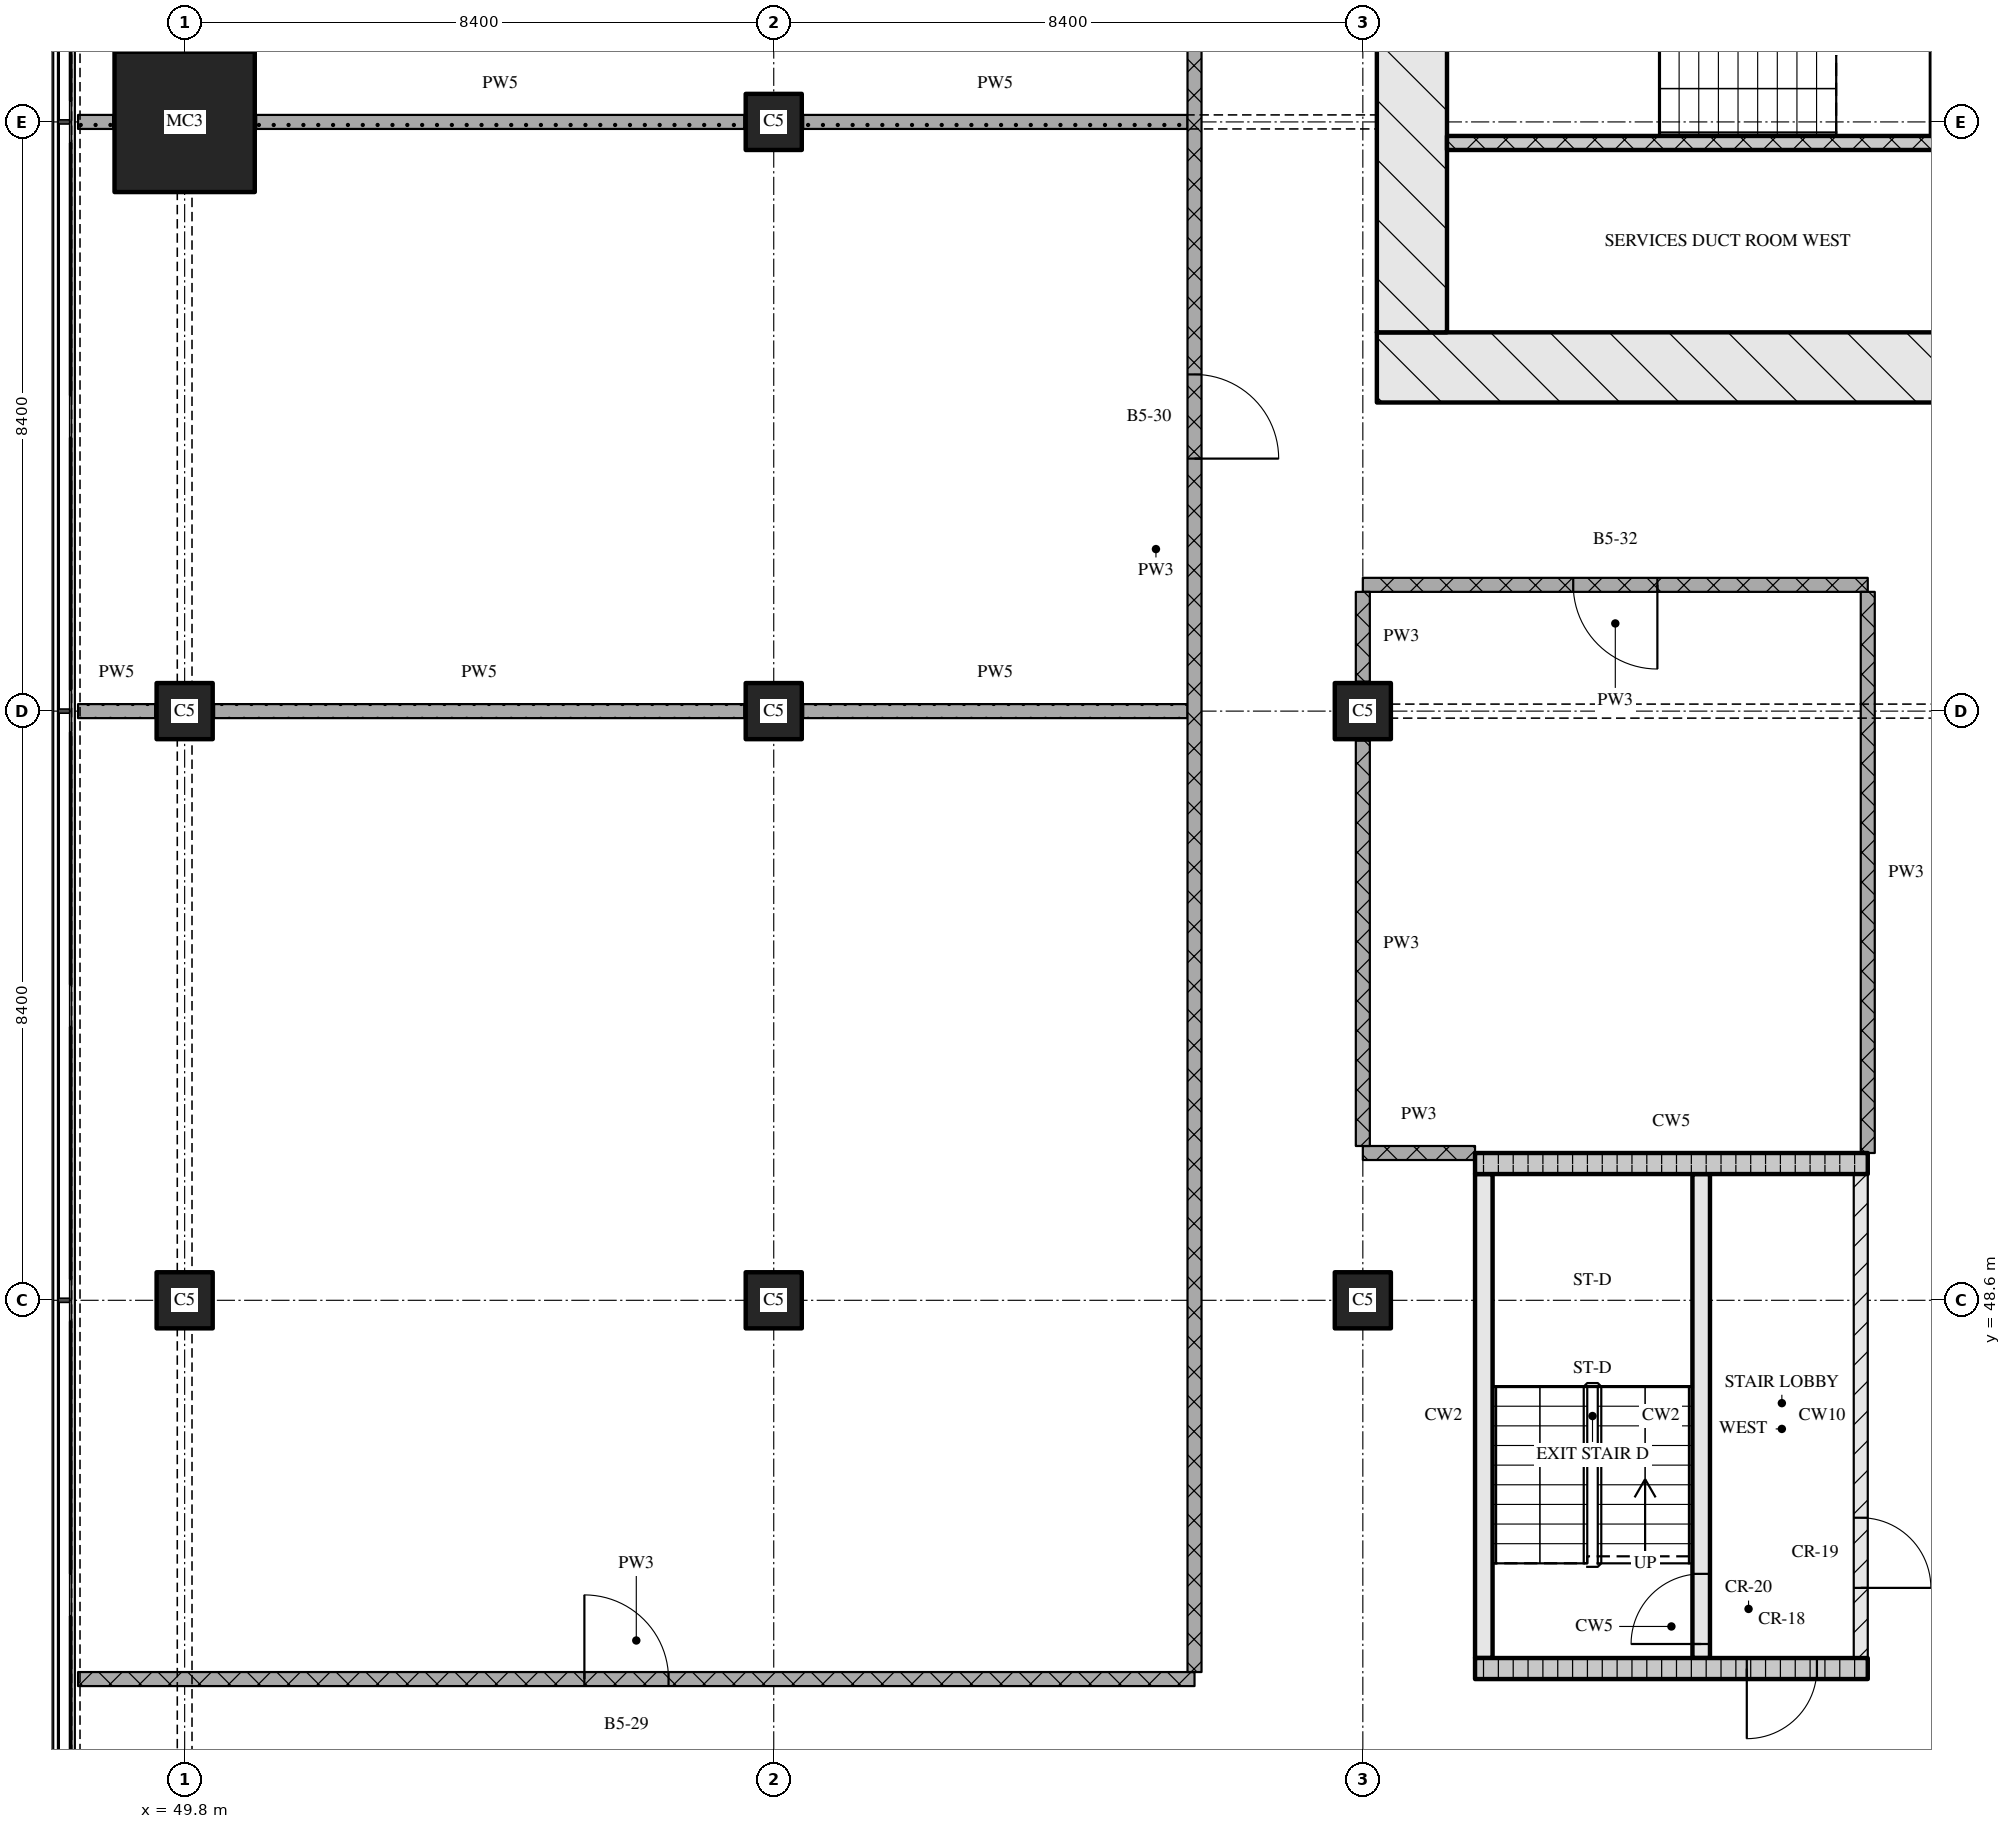
"""IFC4 building model, lengths in metres.
Left out: names, types, materials, properties, quantities, classifications, styles, units other than length and angle.
Written with IfcOpenShell. Run it as: python <this file> out.ifc"""

import sys

from ifc_helpers import new_model, si_unit, direction, frame, frame_2d, origin, origin_2d, place, context, subcontext, project, spatial, rectangle, extrude, element, fill, save


model = new_model("IFC4")
c1 = context("Model", 3, precision=1e-05, world=origin(), true_north=direction((0.0, 1.0)))
c2 = subcontext(c1, "Body", "Model", "MODEL_VIEW")
j1 = project(units=[si_unit("LENGTHUNIT", "METRE"), si_unit("PLANEANGLEUNIT", "RADIAN")], contexts=[c1])
p1 = place(None, origin())
s1 = spatial("IfcSite", under=j1, at=p1, CompositionType="ELEMENT")
p2 = place(p1, origin())
s2 = spatial("IfcBuilding", under=s1, at=p2, CompositionType="ELEMENT")
p3 = place(p2, frame((0.0, 0.0, 138.45)))
s3 = spatial("IfcBuildingStorey", under=s2, at=p3, CompositionType="ELEMENT", Elevation=138.45)
for number, where, z_axis, x_axis in (
    (1, (49.8, 48.6, 0.0), (0.0, 0.0, 1.0), (1.0, 0.0, 0.0)),
    (2, (49.8, 57.0, 0.0), (0.0, 0.0, 1.0), (1.0, 0.0, 0.0)),
):
    element("IfcColumn", number, at=place(p3, frame(where, z_axis=z_axis, x_axis=x_axis)), inside=s3, PredefinedType="COLUMN", context=c2, shape_type="SweptSolid", body=[
        extrude(rectangle(XDim=0.8, YDim=0.8, at=origin_2d()), origin(), (0.0, 0.0, 1.0), 3.6),
    ])
p4 = place(p3, frame((49.8, 65.4, 0.0), z_axis=(0.0, 0.0, 1.0), x_axis=(1.0, 0.0, 0.0)))
e3 = element("IfcColumn", 3, at=p4, inside=s3, PredefinedType="COLUMN", context=c2, shape_type="SweptSolid", body=[
    extrude(rectangle(XDim=2.0, YDim=2.0, at=origin_2d()), origin(), (0.0, 0.0, 1.0), 3.6),
])
for number, where, z_axis, x_axis in (
    (4, (58.2, 48.6, 0.0), (0.0, 0.0, 1.0), (1.0, 0.0, 0.0)),
    (5, (58.2, 57.0, 0.0), (0.0, 0.0, 1.0), (1.0, 0.0, 0.0)),
    (6, (58.2, 65.4, 0.0), (0.0, 0.0, 1.0), (1.0, 0.0, 0.0)),
    (7, (66.6, 48.6, 0.0), (0.0, 0.0, 1.0), (1.0, 0.0, 0.0)),
    (8, (66.6, 57.0, 0.0), (0.0, 0.0, 1.0), (1.0, 0.0, 0.0)),
):
    element("IfcColumn", number, at=place(p3, frame(where, z_axis=z_axis, x_axis=x_axis)), inside=s3, PredefinedType="COLUMN", context=c2, shape_type="SweptSolid", body=[
        extrude(rectangle(XDim=0.8, YDim=0.8, at=origin_2d()), origin(), (0.0, 0.0, 1.0), 3.6),
    ])
p5 = place(p3, frame((66.8, 61.9, 0.0), z_axis=(0.0, 0.0, 1.0), x_axis=(1.0, 0.0, 0.0)))
e9 = element("IfcWall", 9, at=p5, inside=s3, PredefinedType="SOLIDWALL", context=c2, shape_type="SweptSolid", body=[
    extrude(rectangle(XDim=41.6, YDim=1.0, at=frame_2d((20.8, 0.0))), origin(), (0.0, 0.0, 1.0), 3.3),
])
p6 = place(p5, frame((21.15, 0.0, 0.0)))
e10 = element("IfcOpeningElement", 10, at=p6, cuts=e9, PredefinedType="OPENING", context=c2, shape_type="SweptSolid", body=[
    extrude(rectangle(XDim=1.8, YDim=2.1, at=frame_2d((0.9, 1.05))), frame((0.0, 0.51, 0.0), z_axis=(0.0, -1.0, 0.0), x_axis=(1.0, 0.0, 0.0)), (0.0, 0.0, 1.0), 1.02),
])
p7 = place(p3, frame((67.3, 62.4, 0.0), z_axis=(0.0, 0.0, 1.0), x_axis=(0.0, 1.0, 0.0)))
e11 = element("IfcWall", 11, at=p7, inside=s3, PredefinedType="SOLIDWALL", context=c2, shape_type="SweptSolid", body=[
    extrude(rectangle(XDim=12.0, YDim=1.0, at=frame_2d((6.0, 0.0))), origin(), (0.0, 0.0, 1.0), 3.3),
])
p8 = place(p7, frame((6.45, 0.0, 0.0)))
e12 = element("IfcOpeningElement", 12, at=p8, cuts=e11, PredefinedType="OPENING", context=c2, shape_type="SweptSolid", body=[
    extrude(rectangle(XDim=1.2, YDim=2.1, at=frame_2d((0.6, 1.05))), frame((0.0, 0.51, 0.0), z_axis=(0.0, -1.0, 0.0), x_axis=(1.0, 0.0, 0.0)), (0.0, 0.0, 1.0), 1.02),
])
p9 = place(p3, frame((67.8, 65.1, 0.0), z_axis=(0.0, 0.0, 1.0), x_axis=(1.0, 0.0, 0.0)))
e13 = element("IfcWall", 13, at=p9, inside=s3, PredefinedType="SOLIDWALL", context=c2, shape_type="SweptSolid", body=[
    extrude(rectangle(XDim=18.5, YDim=0.2, at=frame_2d((9.25, 0.0))), origin(), (0.0, 0.0, 1.0), 3.3),
])
p10 = place(p9, frame((7.27, 0.0, 0.0)))
e14 = element("IfcOpeningElement", 14, at=p10, cuts=e13, PredefinedType="OPENING", context=c2, shape_type="SweptSolid", body=[
    extrude(rectangle(XDim=0.9, YDim=2.1, at=frame_2d((0.45, 1.05))), frame((0.0, 0.11, 0.0), z_axis=(0.0, -1.0, 0.0), x_axis=(1.0, 0.0, 0.0)), (0.0, 0.0, 1.0), 0.22),
])
p11 = place(p9, frame((8.85, 0.0, 0.0)))
e15 = element("IfcOpeningElement", 15, at=p11, cuts=e13, PredefinedType="OPENING", context=c2, shape_type="SweptSolid", body=[
    extrude(rectangle(XDim=1.1, YDim=2.1, at=frame_2d((0.55, 1.05))), frame((0.0, 0.11, 0.0), z_axis=(0.0, -1.0, 0.0), x_axis=(1.0, 0.0, 0.0)), (0.0, 0.0, 1.0), 0.22),
])
p12 = place(p9, frame((11.35, 0.0, 0.0)))
e16 = element("IfcOpeningElement", 16, at=p12, cuts=e13, PredefinedType="OPENING", context=c2, shape_type="SweptSolid", body=[
    extrude(rectangle(XDim=1.1, YDim=2.1, at=frame_2d((0.55, 1.05))), frame((0.0, 0.11, 0.0), z_axis=(0.0, -1.0, 0.0), x_axis=(1.0, 0.0, 0.0)), (0.0, 0.0, 1.0), 0.22),
])
p13 = place(p9, frame((13.85, 0.0, 0.0)))
e17 = element("IfcOpeningElement", 17, at=p13, cuts=e13, PredefinedType="OPENING", context=c2, shape_type="SweptSolid", body=[
    extrude(rectangle(XDim=1.1, YDim=2.1, at=frame_2d((0.55, 1.05))), frame((0.0, 0.11, 0.0), z_axis=(0.0, -1.0, 0.0), x_axis=(1.0, 0.0, 0.0)), (0.0, 0.0, 1.0), 0.22),
])
p14 = place(p9, frame((16.7, 0.0, 0.0)))
e18 = element("IfcOpeningElement", 18, at=p14, cuts=e13, PredefinedType="OPENING", context=c2, shape_type="SweptSolid", body=[
    extrude(rectangle(XDim=0.9, YDim=2.1, at=frame_2d((0.45, 1.05))), frame((0.0, 0.11, 0.0), z_axis=(0.0, -1.0, 0.0), x_axis=(1.0, 0.0, 0.0)), (0.0, 0.0, 1.0), 0.22),
])
p15 = place(p3, frame((68.2, 43.35, 0.0), z_axis=(0.0, 0.0, 1.0), x_axis=(1.0, 0.0, 0.0)))
e19 = element("IfcWall", 19, at=p15, inside=s3, PredefinedType="SOLIDWALL", context=c2, shape_type="SweptSolid", body=[
    extrude(rectangle(XDim=5.6, YDim=0.3, at=frame_2d((2.8, 0.0))), origin(), (0.0, 0.0, 1.0), 3.3),
])
p16 = place(p15, frame((3.875, 0.0, 0.0)))
e20 = element("IfcOpeningElement", 20, at=p16, cuts=e19, PredefinedType="OPENING", context=c2, shape_type="SweptSolid", body=[
    extrude(rectangle(XDim=1.0, YDim=2.1, at=frame_2d((0.5, 1.05))), frame((0.0, 0.16, 0.0), z_axis=(0.0, -1.0, 0.0), x_axis=(1.0, 0.0, 0.0)), (0.0, 0.0, 1.0), 0.32),
])
p17 = place(p3, frame((68.325, 43.5, 0.0), z_axis=(0.0, 0.0, 1.0), x_axis=(0.0, 1.0, 0.0)))
e21 = element("IfcWall", 21, at=p17, inside=s3, PredefinedType="SOLIDWALL", context=c2, shape_type="SweptSolid", body=[
    extrude(rectangle(XDim=6.9, YDim=0.25, at=frame_2d((3.45, 0.0))), origin(), (0.0, 0.0, 1.0), 3.3),
])
p18 = place(p3, frame((71.425, 43.5, 0.0), z_axis=(0.0, 0.0, 1.0), x_axis=(0.0, 1.0, 0.0)))
e22 = element("IfcWall", 22, at=p18, inside=s3, PredefinedType="SOLIDWALL", context=c2, shape_type="SweptSolid", body=[
    extrude(rectangle(XDim=6.9, YDim=0.25, at=frame_2d((3.45, 0.0))), origin(), (0.0, 0.0, 1.0), 3.3),
])
p19 = place(p18, frame((0.2, 0.0, 0.0)))
e23 = element("IfcOpeningElement", 23, at=p19, cuts=e22, PredefinedType="OPENING", context=c2, shape_type="SweptSolid", body=[
    extrude(rectangle(XDim=1.0, YDim=2.1, at=frame_2d((0.5, 1.05))), frame((0.0, 0.135, 0.0), z_axis=(0.0, -1.0, 0.0), x_axis=(1.0, 0.0, 0.0)), (0.0, 0.0, 1.0), 0.27),
])
p20 = place(p3, frame((73.7, 43.5, 0.0), z_axis=(0.0, 0.0, 1.0), x_axis=(0.0, 1.0, 0.0)))
e24 = element("IfcWall", 24, at=p20, inside=s3, PredefinedType="PARTITIONING", context=c2, shape_type="SweptSolid", body=[
    extrude(rectangle(XDim=6.9, YDim=0.2, at=frame_2d((3.45, 0.0))), origin(), (0.0, 0.0, 1.0), 3.3),
])
p21 = place(p20, frame((1.0, 0.0, 0.0)))
e25 = element("IfcOpeningElement", 25, at=p21, cuts=e24, PredefinedType="OPENING", context=c2, shape_type="SweptSolid", body=[
    extrude(rectangle(XDim=1.0, YDim=2.1, at=frame_2d((0.5, 1.05))), frame((0.0, 0.11, 0.0), z_axis=(0.0, -1.0, 0.0), x_axis=(1.0, 0.0, 0.0)), (0.0, 0.0, 1.0), 0.22),
])
p22 = place(p3, frame((68.2, 50.55, 0.0), z_axis=(0.0, 0.0, 1.0), x_axis=(1.0, 0.0, 0.0)))
e26 = element("IfcWall", 26, at=p22, inside=s3, PredefinedType="SOLIDWALL", context=c2, shape_type="SweptSolid", body=[
    extrude(rectangle(XDim=5.6, YDim=0.3, at=frame_2d((2.8, 0.0))), origin(), (0.0, 0.0, 1.0), 3.3),
])
p23 = place(p3, frame((48.28, 43.2, 0.0), z_axis=(0.0, 0.0, 1.0), x_axis=(1.0, 0.0, 0.0)))
e27 = element("IfcWall", 27, at=p23, inside=s3, PredefinedType="PARTITIONING", context=c2, shape_type="SweptSolid", body=[
    extrude(rectangle(XDim=15.92, YDim=0.2, at=frame_2d((7.96, 0.0))), origin(), (0.0, 0.0, 1.0), 3.3),
])
p24 = place(p23, frame((7.22, 0.0, 0.0)))
e28 = element("IfcOpeningElement", 28, at=p24, cuts=e27, PredefinedType="OPENING", context=c2, shape_type="SweptSolid", body=[
    extrude(rectangle(XDim=1.2, YDim=2.1, at=frame_2d((0.6, 1.05))), frame((0.0, 0.11, 0.0), z_axis=(0.0, -1.0, 0.0), x_axis=(1.0, 0.0, 0.0)), (0.0, 0.0, 1.0), 0.22),
])
p25 = place(p3, frame((66.6, 50.7, 0.0), z_axis=(0.0, 0.0, 1.0), x_axis=(1.0, 0.0, 0.0)))
e29 = element("IfcWall", 29, at=p25, inside=s3, PredefinedType="PARTITIONING", context=c2, shape_type="SweptSolid", body=[
    extrude(rectangle(XDim=1.6, YDim=0.2, at=frame_2d((0.8, 0.0))), origin(), (0.0, 0.0, 1.0), 3.3),
])
p26 = place(p3, frame((48.28, 57.0, 0.0), z_axis=(0.0, 0.0, 1.0), x_axis=(1.0, 0.0, 0.0)))
e30 = element("IfcWall", 30, at=p26, inside=s3, PredefinedType="PARTITIONING", context=c2, shape_type="SweptSolid", body=[
    extrude(rectangle(XDim=1.1, YDim=0.2, at=frame_2d((0.55, 0.0))), origin(), (0.0, 0.0, 1.0), 3.3),
])
p27 = place(p3, frame((50.22, 57.0, 0.0), z_axis=(0.0, 0.0, 1.0), x_axis=(1.0, 0.0, 0.0)))
e31 = element("IfcWall", 31, at=p27, inside=s3, PredefinedType="PARTITIONING", context=c2, shape_type="SweptSolid", body=[
    extrude(rectangle(XDim=7.56, YDim=0.2, at=frame_2d((3.78, 0.0))), origin(), (0.0, 0.0, 1.0), 3.3),
])
p28 = place(p3, frame((58.62, 57.0, 0.0), z_axis=(0.0, 0.0, 1.0), x_axis=(1.0, 0.0, 0.0)))
e32 = element("IfcWall", 32, at=p28, inside=s3, PredefinedType="PARTITIONING", context=c2, shape_type="SweptSolid", body=[
    extrude(rectangle(XDim=5.48, YDim=0.2, at=frame_2d((2.74, 0.0))), origin(), (0.0, 0.0, 1.0), 3.3),
])
p29 = place(p3, frame((73.8, 58.8, 0.0), z_axis=(0.0, 0.0, 1.0), x_axis=(-1.0, 0.0, 0.0)))
e33 = element("IfcWall", 33, at=p29, inside=s3, PredefinedType="PARTITIONING", context=c2, shape_type="SweptSolid", body=[
    extrude(rectangle(XDim=7.2, YDim=0.2, at=frame_2d((3.6, 0.0))), origin(), (0.0, 0.0, 1.0), 3.3),
])
p30 = place(p29, frame((3.0, 0.0, 0.0)))
e34 = element("IfcOpeningElement", 34, at=p30, cuts=e33, PredefinedType="OPENING", context=c2, shape_type="SweptSolid", body=[
    extrude(rectangle(XDim=1.2, YDim=2.1, at=frame_2d((0.6, 1.05))), frame((0.0, 0.11, 0.0), z_axis=(0.0, -1.0, 0.0), x_axis=(1.0, 0.0, 0.0)), (0.0, 0.0, 1.0), 0.22),
])
p31 = place(p3, frame((48.28, 65.4, 0.0), z_axis=(0.0, 0.0, 1.0), x_axis=(1.0, 0.0, 0.0)))
e35 = element("IfcWall", 35, at=p31, inside=s3, PredefinedType="PARTITIONING", context=c2, shape_type="SweptSolid", body=[
    extrude(rectangle(XDim=0.5, YDim=0.2, at=frame_2d((0.25, 0.0))), origin(), (0.0, 0.0, 1.0), 3.3),
])
p32 = place(p3, frame((50.82, 65.4, 0.0), z_axis=(0.0, 0.0, 1.0), x_axis=(1.0, 0.0, 0.0)))
e36 = element("IfcWall", 36, at=p32, inside=s3, PredefinedType="PARTITIONING", context=c2, shape_type="SweptSolid", body=[
    extrude(rectangle(XDim=6.96, YDim=0.2, at=frame_2d((3.48, 0.0))), origin(), (0.0, 0.0, 1.0), 3.3),
])
p33 = place(p3, frame((58.62, 65.4, 0.0), z_axis=(0.0, 0.0, 1.0), x_axis=(1.0, 0.0, 0.0)))
e37 = element("IfcWall", 37, at=p33, inside=s3, PredefinedType="PARTITIONING", context=c2, shape_type="SweptSolid", body=[
    extrude(rectangle(XDim=5.48, YDim=0.2, at=frame_2d((2.74, 0.0))), origin(), (0.0, 0.0, 1.0), 2.9),
])
p34 = place(p3, frame((64.2, 43.3, 0.0), z_axis=(0.0, 0.0, 1.0), x_axis=(0.0, 1.0, 0.0)))
e38 = element("IfcWall", 38, at=p34, inside=s3, PredefinedType="PARTITIONING", context=c2, shape_type="SweptSolid", body=[
    extrude(rectangle(XDim=32.02, YDim=0.2, at=frame_2d((16.01, 0.0))), origin(), (0.0, 0.0, 1.0), 3.3),
])
p35 = place(p34, frame((17.3, 0.0, 0.0)))
e39 = element("IfcOpeningElement", 39, at=p35, cuts=e38, PredefinedType="OPENING", context=c2, shape_type="SweptSolid", body=[
    extrude(rectangle(XDim=1.2, YDim=2.1, at=frame_2d((0.6, 1.05))), frame((0.0, 0.11, 0.0), z_axis=(0.0, -1.0, 0.0), x_axis=(1.0, 0.0, 0.0)), (0.0, 0.0, 1.0), 0.22),
])
p36 = place(p34, frame((26.241, 0.0, 0.0)))
e40 = element("IfcOpeningElement", 40, at=p36, cuts=e38, PredefinedType="OPENING", context=c2, shape_type="SweptSolid", body=[
    extrude(rectangle(XDim=1.2, YDim=2.1, at=frame_2d((0.6, 1.05))), frame((0.0, 0.11, 0.0), z_axis=(0.0, -1.0, 0.0), x_axis=(1.0, 0.0, 0.0)), (0.0, 0.0, 1.0), 0.22),
])
p37 = place(p3, frame((66.6, 56.58, 0.0), z_axis=(0.0, 0.0, 1.0), x_axis=(0.0, -1.0, 0.0)))
e41 = element("IfcWall", 41, at=p37, inside=s3, PredefinedType="PARTITIONING", context=c2, shape_type="SweptSolid", body=[
    extrude(rectangle(XDim=5.78, YDim=0.2, at=frame_2d((2.89, 0.0))), origin(), (0.0, 0.0, 1.0), 3.3),
])
p38 = place(p3, frame((66.6, 58.7, 0.0), z_axis=(0.0, 0.0, 1.0), x_axis=(0.0, -1.0, 0.0)))
e42 = element("IfcWall", 42, at=p38, inside=s3, PredefinedType="PARTITIONING", context=c2, shape_type="SweptSolid", body=[
    extrude(rectangle(XDim=1.28, YDim=0.2, at=frame_2d((0.64, 0.0))), origin(), (0.0, 0.0, 1.0), 3.3),
])
p39 = place(p3, frame((73.8, 58.7, 0.0), z_axis=(0.0, 0.0, 1.0), x_axis=(0.0, -1.0, 0.0)))
e43 = element("IfcWall", 43, at=p39, inside=s3, PredefinedType="PARTITIONING", context=c2, shape_type="SweptSolid", body=[
    extrude(rectangle(XDim=8.0, YDim=0.2, at=frame_2d((4.0, 0.0))), origin(), (0.0, 0.0, 1.0), 3.3),
])
p40 = place(p16, origin())
e44 = element("IfcDoor", 44, at=p40, inside=s3, OperationType="SINGLE_SWING_RIGHT", PredefinedType="DOOR", context=c2, shape_type="SweptSolid", body=[
    extrude(rectangle(XDim=1.0, YDim=2.1, at=frame_2d((0.5, 1.05))), frame((0.0, 0.025, 0.0), z_axis=(0.0, -1.0, 0.0), x_axis=(1.0, 0.0, 0.0)), (0.0, 0.0, 1.0), 0.05),
])
fill(e20, e44)
p41 = place(p19, origin())
e45 = element("IfcDoor", 45, at=p41, inside=s3, OperationType="SINGLE_SWING_LEFT", PredefinedType="DOOR", context=c2, shape_type="SweptSolid", body=[
    extrude(rectangle(XDim=1.0, YDim=2.1, at=frame_2d((0.5, 1.05))), frame((0.0, 0.025, 0.0), z_axis=(0.0, -1.0, 0.0), x_axis=(1.0, 0.0, 0.0)), (0.0, 0.0, 1.0), 0.05),
])
fill(e23, e45)
p42 = place(p21, origin())
e46 = element("IfcDoor", 46, at=p42, inside=s3, OperationType="SINGLE_SWING_RIGHT", PredefinedType="DOOR", context=c2, shape_type="SweptSolid", body=[
    extrude(rectangle(XDim=1.0, YDim=2.1, at=frame_2d((0.5, 1.05))), frame((0.0, 0.025, 0.0), z_axis=(0.0, -1.0, 0.0), x_axis=(1.0, 0.0, 0.0)), (0.0, 0.0, 1.0), 0.05),
])
fill(e25, e46)
p43 = place(p24, origin())
e47 = element("IfcDoor", 47, at=p43, inside=s3, OperationType="SINGLE_SWING_LEFT", PredefinedType="DOOR", context=c2, shape_type="SweptSolid", body=[
    extrude(rectangle(XDim=1.2, YDim=2.1, at=frame_2d((0.6, 1.05))), frame((0.0, 0.025, 0.0), z_axis=(0.0, -1.0, 0.0), x_axis=(1.0, 0.0, 0.0)), (0.0, 0.0, 1.0), 0.05),
])
fill(e28, e47)
p44 = place(p30, origin())
e48 = element("IfcDoor", 48, at=p44, inside=s3, OperationType="SINGLE_SWING_LEFT", PredefinedType="DOOR", context=c2, shape_type="SweptSolid", body=[
    extrude(rectangle(XDim=1.2, YDim=2.1, at=frame_2d((0.6, 1.05))), frame((0.0, 0.025, 0.0), z_axis=(0.0, -1.0, 0.0), x_axis=(1.0, 0.0, 0.0)), (0.0, 0.0, 1.0), 0.05),
])
fill(e34, e48)
p45 = place(p35, origin())
e49 = element("IfcDoor", 49, at=p45, inside=s3, OperationType="SINGLE_SWING_RIGHT", PredefinedType="DOOR", context=c2, shape_type="SweptSolid", body=[
    extrude(rectangle(XDim=1.2, YDim=2.1, at=frame_2d((0.6, 1.05))), frame((0.0, 0.025, 0.0), z_axis=(0.0, -1.0, 0.0), x_axis=(1.0, 0.0, 0.0)), (0.0, 0.0, 1.0), 0.05),
])
fill(e39, e49)
save(model, sys.argv[1])
